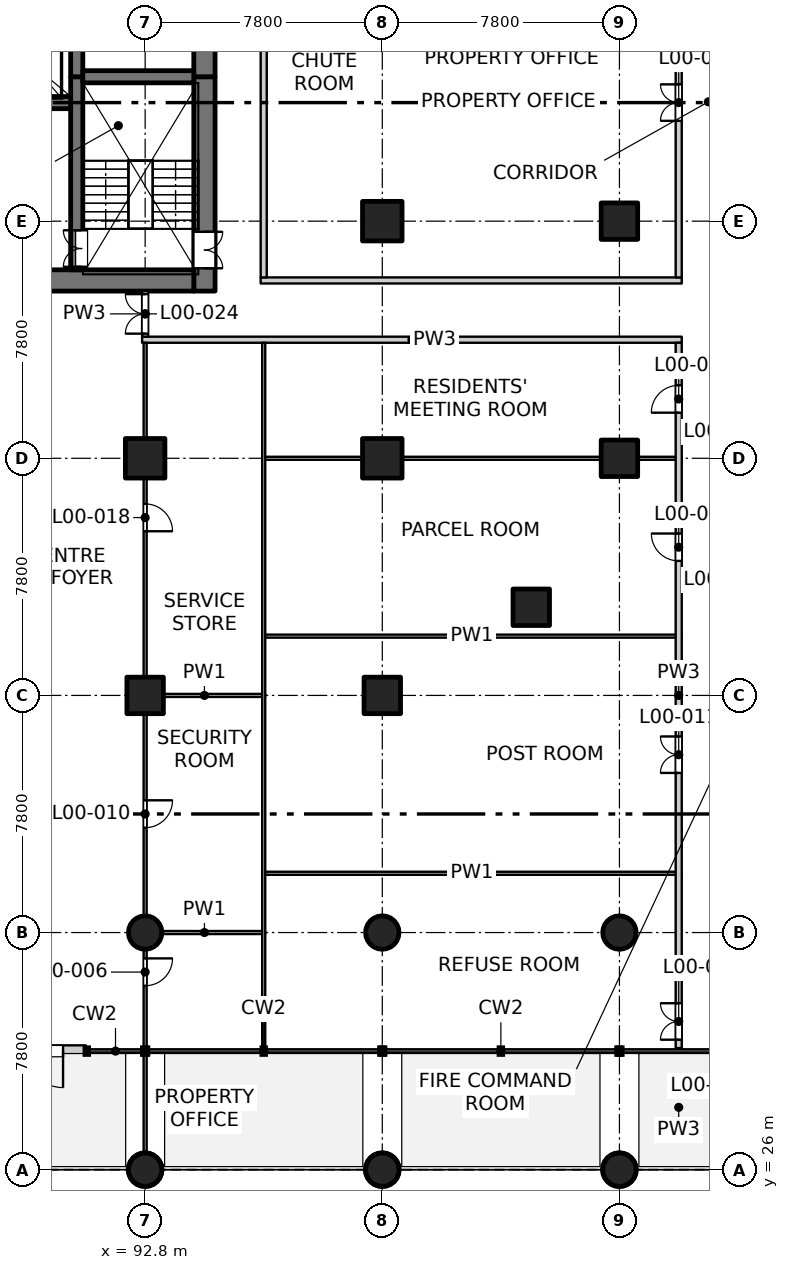
"""IFC4 building model, lengths in metres.
Left out: names, types, materials, properties, quantities, classifications, styles, units other than length and angle.
Written with IfcOpenShell. Run it as: python <this file> out.ifc"""

import sys

from ifc_helpers import new_model, si_unit, direction, frame, frame_2d, origin, origin_2d, place, context, subcontext, project, spatial, rectangle, circle, extrude, element, fill, save


model = new_model("IFC4")
c1 = context("Model", 3, precision=1e-05, world=origin(), true_north=direction((0.0, 1.0)))
c2 = subcontext(c1, "Body", "Model", "MODEL_VIEW")
j1 = project(units=[si_unit("LENGTHUNIT", "METRE"), si_unit("PLANEANGLEUNIT", "RADIAN")], contexts=[c1])
p1 = place(None, origin())
s1 = spatial("IfcSite", under=j1, at=p1, CompositionType="ELEMENT")
p2 = place(p1, origin())
s2 = spatial("IfcBuilding", under=s1, at=p2, CompositionType="ELEMENT")
p3 = place(p2, origin())
s3 = spatial("IfcBuildingStorey", under=s2, at=p3, CompositionType="ELEMENT", Elevation=0.0)
for number, where, z_axis, x_axis in (
    (1, (105.5, 44.5, -0.4), (0.0, 0.0, 1.0), (1.0, 0.0, 0.0)),
    (2, (108.4, 49.4, -0.4), (0.0, 0.0, 1.0), (1.0, 0.0, 0.0)),
    (3, (108.4, 57.2, -0.4), (0.0, 0.0, 1.0), (1.0, 0.0, 0.0)),
    (4, (92.8, 41.6, -0.4), (0.0, 0.0, 1.0), (1.0, 0.0, 0.0)),
    (5, (100.6, 41.6, -0.4), (0.0, 0.0, 1.0), (1.0, 0.0, 0.0)),
):
    element("IfcColumn", number, at=place(p3, frame(where, z_axis=z_axis, x_axis=x_axis)), inside=s3, PredefinedType="COLUMN", context=c2, shape_type="SweptSolid", body=[
        extrude(rectangle(XDim=1.2, YDim=1.2, at=origin_2d()), origin(), (0.0, 0.0, 1.0), 6.1),
    ])
for number, where, z_axis, x_axis in (
    (6, (92.8, 49.4, -0.4), (0.0, 0.0, 1.0), (1.0, 0.0, 0.0)),
    (7, (100.6, 49.4, -0.4), (0.0, 0.0, 1.0), (1.0, 0.0, 0.0)),
    (8, (100.6, 57.2, -0.4), (0.0, 0.0, 1.0), (1.0, 0.0, 0.0)),
):
    element("IfcColumn", number, at=place(p3, frame(where, z_axis=z_axis, x_axis=x_axis)), inside=s3, PredefinedType="COLUMN", context=c2, shape_type="SweptSolid", body=[
        extrude(rectangle(XDim=1.3, YDim=1.3, at=origin_2d()), origin(), (0.0, 0.0, 1.0), 6.1),
    ])
for number, where, z_axis, x_axis in (
    (9, (92.8, 26.0, -0.4), (0.0, 0.0, 1.0), (1.0, 0.0, 0.0)),
    (10, (92.8, 33.8, -0.4), (0.0, 0.0, 1.0), (1.0, 0.0, 0.0)),
    (11, (100.6, 26.0, -0.4), (0.0, 0.0, 1.0), (1.0, 0.0, 0.0)),
    (12, (100.6, 33.8, -0.4), (0.0, 0.0, 1.0), (1.0, 0.0, 0.0)),
    (13, (108.4, 26.0, -0.4), (0.0, 0.0, 1.0), (1.0, 0.0, 0.0)),
    (14, (108.4, 33.8, -0.4), (0.0, 0.0, 1.0), (1.0, 0.0, 0.0)),
):
    element("IfcColumn", number, at=place(p3, frame(where, z_axis=z_axis, x_axis=x_axis)), inside=s3, PredefinedType="COLUMN", context=c2, shape_type="SweptSolid", body=[
        extrude(circle(Radius=0.55, at=origin_2d()), origin(), (0.0, 0.0, 1.0), 6.1),
    ])
p4 = place(p3, frame((94.75, 54.9, -0.4), z_axis=(0.0, 0.0, 1.0), x_axis=(0.0, 1.0, 0.0)))
e15 = element("IfcWall", 15, at=p4, inside=s3, PredefinedType="SOLIDWALL", context=c2, shape_type="SweptSolid", body=[
    extrude(rectangle(XDim=7.05, YDim=0.7, at=frame_2d((3.525, 0.0))), origin(), (0.0, 0.0, 1.0), 6.1),
])
p5 = place(p4, frame((0.75, 0.0, 0.4)))
e16 = element("IfcOpeningElement", 16, at=p5, cuts=e15, PredefinedType="OPENING", context=c2, shape_type="SweptSolid", body=[
    extrude(rectangle(XDim=1.2, YDim=2.1, at=frame_2d((0.6, 1.05))), frame((0.0, 0.36, 0.0), z_axis=(0.0, -1.0, 0.0), x_axis=(1.0, 0.0, 0.0)), (0.0, 0.0, 1.0), 0.72),
])
p6 = place(p3, frame((94.75, 61.95, -0.4), z_axis=(0.0, 0.0, 1.0), x_axis=(0.0, 1.0, 0.0)))
e17 = element("IfcWall", 17, at=p6, inside=s3, PredefinedType="SOLIDWALL", context=c2, shape_type="SweptSolid", body=[
    extrude(rectangle(XDim=15.35, YDim=0.7, at=frame_2d((7.675, 0.0))), origin(), (0.0, 0.0, 1.0), 6.1),
])
p7 = place(p6, frame((0.925, 0.0, 0.4)))
e18 = element("IfcOpeningElement", 18, at=p7, cuts=e17, PredefinedType="OPENING", context=c2, shape_type="SweptSolid", body=[
    extrude(rectangle(XDim=0.9, YDim=2.1, at=frame_2d((0.45, 1.05))), frame((0.0, 0.36, 0.0), z_axis=(0.0, -1.0, 0.0), x_axis=(1.0, 0.0, 0.0)), (0.0, 0.0, 1.0), 0.72),
])
p8 = place(p6, frame((6.8, 0.0, 0.4)))
e19 = element("IfcOpeningElement", 19, at=p8, cuts=e17, PredefinedType="OPENING", context=c2, shape_type="SweptSolid", body=[
    extrude(rectangle(XDim=0.9, YDim=2.1, at=frame_2d((0.45, 1.05))), frame((0.0, 0.36, 0.0), z_axis=(0.0, -1.0, 0.0), x_axis=(1.0, 0.0, 0.0)), (0.0, 0.0, 1.0), 0.72),
])
p9 = place(p6, frame((13.1, 0.0, 0.4)))
e20 = element("IfcOpeningElement", 20, at=p9, cuts=e17, PredefinedType="OPENING", context=c2, shape_type="SweptSolid", body=[
    extrude(rectangle(XDim=0.9, YDim=2.1, at=frame_2d((0.45, 1.05))), frame((0.0, 0.36, 0.0), z_axis=(0.0, -1.0, 0.0), x_axis=(1.0, 0.0, 0.0)), (0.0, 0.0, 1.0), 0.72),
])
p10 = place(p3, frame((75.6, 55.25, -0.4), z_axis=(0.0, 0.0, 1.0), x_axis=(1.0, 0.0, 0.0)))
e21 = element("IfcWall", 21, at=p10, inside=s3, PredefinedType="SOLIDWALL", context=c2, shape_type="SweptSolid", body=[
    extrude(rectangle(XDim=18.8, YDim=0.7, at=frame_2d((9.4, 0.0))), origin(), (0.0, 0.0, 1.0), 6.1),
])
p11 = place(p10, frame((8.65, 0.0, 0.4)))
e22 = element("IfcOpeningElement", 22, at=p11, cuts=e21, PredefinedType="OPENING", context=c2, shape_type="SweptSolid", body=[
    extrude(rectangle(XDim=1.5, YDim=2.1, at=frame_2d((0.75, 1.05))), frame((0.0, 0.36, 0.0), z_axis=(0.0, -1.0, 0.0), x_axis=(1.0, 0.0, 0.0)), (0.0, 0.0, 1.0), 0.72),
])
p12 = place(p3, frame((90.55, 55.6, -0.4), z_axis=(0.0, 0.0, 1.0), x_axis=(0.0, 1.0, 0.0)))
e23 = element("IfcWall", 23, at=p12, inside=s3, PredefinedType="SOLIDWALL", context=c2, shape_type="SweptSolid", body=[
    extrude(rectangle(XDim=6.35, YDim=0.4, at=frame_2d((3.175, 0.0))), origin(), (0.0, 0.0, 1.0), 6.1),
])
p13 = place(p12, frame((0.1, 0.0, 0.4)))
e24 = element("IfcOpeningElement", 24, at=p13, cuts=e23, PredefinedType="OPENING", context=c2, shape_type="SweptSolid", body=[
    extrude(rectangle(XDim=1.2, YDim=2.1, at=frame_2d((0.6, 1.05))), frame((0.0, 0.21, 0.0), z_axis=(0.0, -1.0, 0.0), x_axis=(1.0, 0.0, 0.0)), (0.0, 0.0, 1.0), 0.42),
])
p14 = place(p3, frame((90.55, 61.95, -0.4), z_axis=(0.0, 0.0, 1.0), x_axis=(0.0, 1.0, 0.0)))
e25 = element("IfcWall", 25, at=p14, inside=s3, PredefinedType="SOLIDWALL", context=c2, shape_type="SweptSolid", body=[
    extrude(rectangle(XDim=15.35, YDim=0.4, at=frame_2d((7.675, 0.0))), origin(), (0.0, 0.0, 1.0), 6.1),
])
p15 = place(p3, frame((87.35, 61.1, -0.4), z_axis=(0.0, 0.0, 1.0), x_axis=(1.0, 0.0, 0.0)))
e26 = element("IfcWall", 26, at=p15, inside=s3, PredefinedType="SOLIDWALL", context=c2, shape_type="SweptSolid", body=[
    extrude(rectangle(XDim=3.0, YDim=0.4, at=frame_2d((1.5, 0.0))), origin(), (0.0, 0.0, 1.0), 6.1),
])
p16 = place(p3, frame((90.75, 61.95, -0.4), z_axis=(0.0, 0.0, 1.0), x_axis=(1.0, 0.0, 0.0)))
e27 = element("IfcWall", 27, at=p16, inside=s3, PredefinedType="SOLIDWALL", context=c2, shape_type="SweptSolid", body=[
    extrude(rectangle(XDim=3.65, YDim=0.4, at=frame_2d((1.825, 0.0))), origin(), (0.0, 0.0, 1.0), 6.1),
])
p17 = place(p3, frame((86.95, 29.9, 0.0), z_axis=(0.0, 0.0, 1.0), x_axis=(1.0, 0.0, 0.0)))
e28 = element("IfcWall", 28, at=p17, inside=s3, PredefinedType="SOLIDWALL", context=c2, shape_type="SweptSolid", body=[
    extrude(rectangle(XDim=3.9, YDim=0.38, at=frame_2d((1.95, 0.0))), origin(), (0.0, 0.0, 1.0), 5.7),
])
p18 = place(p17, frame((0.75, 0.0, 0.0)))
e29 = element("IfcOpeningElement", 29, at=p18, cuts=e28, PredefinedType="OPENING", context=c2, shape_type="SweptSolid", body=[
    extrude(rectangle(XDim=2.4, YDim=2.4, at=frame_2d((1.2, 1.2))), frame((0.0, 0.2, 0.0), z_axis=(0.0, -1.0, 0.0), x_axis=(1.0, 0.0, 0.0)), (0.0, 0.0, 1.0), 0.4),
])
p19 = place(p3, frame((92.75, 33.8, 0.0), z_axis=(0.0, 0.0, 1.0), x_axis=(1.0, 0.0, 0.0)))
e30 = element("IfcWall", 30, at=p19, inside=s3, PredefinedType="PARTITIONING", context=c2, shape_type="SweptSolid", body=[
    extrude(rectangle(XDim=4.0, YDim=0.1, at=frame_2d((2.0, 0.0))), origin(), (0.0, 0.0, 1.0), 5.7),
])
p20 = place(p3, frame((96.65, 35.75, 0.0), z_axis=(0.0, 0.0, 1.0), x_axis=(1.0, 0.0, 0.0)))
e31 = element("IfcWall", 31, at=p20, inside=s3, PredefinedType="PARTITIONING", context=c2, shape_type="SweptSolid", body=[
    extrude(rectangle(XDim=13.8, YDim=0.1, at=frame_2d((6.9, 0.0))), origin(), (0.0, 0.0, 1.0), 5.7),
])
p21 = place(p3, frame((92.75, 41.6, 0.0), z_axis=(0.0, 0.0, 1.0), x_axis=(1.0, 0.0, 0.0)))
e32 = element("IfcWall", 32, at=p21, inside=s3, PredefinedType="PARTITIONING", context=c2, shape_type="SweptSolid", body=[
    extrude(rectangle(XDim=4.0, YDim=0.1, at=frame_2d((2.0, 0.0))), origin(), (0.0, 0.0, 1.0), 5.7),
])
for number, where, z_axis, x_axis in (
    (33, (96.65, 43.55, 0.0), (0.0, 0.0, 1.0), (1.0, 0.0, 0.0)),
    (34, (96.65, 49.4, 0.0), (0.0, 0.0, 1.0), (1.0, 0.0, 0.0)),
):
    element("IfcWall", number, at=place(p3, frame(where, z_axis=z_axis, x_axis=x_axis)), inside=s3, PredefinedType="PARTITIONING", context=c2, shape_type="SweptSolid", body=[
        extrude(rectangle(XDim=13.8, YDim=0.1, at=frame_2d((6.9, 0.0))), origin(), (0.0, 0.0, 1.0), 5.7),
    ])
p22 = place(p3, frame((92.7, 53.3, 0.0), z_axis=(0.0, 0.0, 1.0), x_axis=(1.0, 0.0, 0.0)))
e35 = element("IfcWall", 35, at=p22, inside=s3, PredefinedType="PARTITIONING", context=c2, shape_type="SweptSolid", body=[
    extrude(rectangle(XDim=17.75, YDim=0.2, at=frame_2d((8.875, 0.0))), origin(), (0.0, 0.0, 1.0), 5.7),
])
p23 = place(p3, frame((96.6, 55.25, 0.0), z_axis=(0.0, 0.0, 1.0), x_axis=(1.0, 0.0, 0.0)))
e36 = element("IfcWall", 36, at=p23, inside=s3, PredefinedType="PARTITIONING", context=c2, shape_type="SweptSolid", body=[
    extrude(rectangle(XDim=13.85, YDim=0.2, at=frame_2d((6.925, 0.0))), origin(), (0.0, 0.0, 1.0), 5.7),
])
p24 = place(p3, frame((92.8, 26.3, 0.0), z_axis=(0.0, 0.0, 1.0), x_axis=(0.0, 1.0, 0.0)))
e37 = element("IfcWall", 37, at=p24, inside=s3, PredefinedType="PARTITIONING", context=c2, shape_type="SweptSolid", body=[
    extrude(rectangle(XDim=3.5, YDim=0.1, at=frame_2d((1.75, 0.0))), origin(), (0.0, 0.0, 1.0), 5.7),
])
p25 = place(p3, frame((92.8, 30.0, 0.0), z_axis=(0.0, 0.0, 1.0), x_axis=(0.0, 1.0, 0.0)))
e38 = element("IfcWall", 38, at=p25, inside=s3, PredefinedType="PARTITIONING", context=c2, shape_type="SweptSolid", body=[
    extrude(rectangle(XDim=23.2, YDim=0.1, at=frame_2d((11.6, 0.0))), origin(), (0.0, 0.0, 1.0), 5.7),
])
p26 = place(p25, frame((2.05, 0.0, 0.0)))
e39 = element("IfcOpeningElement", 39, at=p26, cuts=e38, PredefinedType="OPENING", context=c2, shape_type="SweptSolid", body=[
    extrude(rectangle(XDim=0.9, YDim=2.1, at=frame_2d((0.45, 1.05))), frame((0.0, 0.06, 0.0), z_axis=(0.0, -1.0, 0.0), x_axis=(1.0, 0.0, 0.0)), (0.0, 0.0, 1.0), 0.12),
])
p27 = place(p25, frame((7.25, 0.0, 0.0)))
e40 = element("IfcOpeningElement", 40, at=p27, cuts=e38, PredefinedType="OPENING", context=c2, shape_type="SweptSolid", body=[
    extrude(rectangle(XDim=0.9, YDim=2.1, at=frame_2d((0.45, 1.05))), frame((0.0, 0.06, 0.0), z_axis=(0.0, -1.0, 0.0), x_axis=(1.0, 0.0, 0.0)), (0.0, 0.0, 1.0), 0.12),
])
p28 = place(p25, frame((17.0, 0.0, 0.0)))
e41 = element("IfcOpeningElement", 41, at=p28, cuts=e38, PredefinedType="OPENING", context=c2, shape_type="SweptSolid", body=[
    extrude(rectangle(XDim=0.9, YDim=2.1, at=frame_2d((0.45, 1.05))), frame((0.0, 0.06, 0.0), z_axis=(0.0, -1.0, 0.0), x_axis=(1.0, 0.0, 0.0)), (0.0, 0.0, 1.0), 0.12),
])
p29 = place(p3, frame((92.8, 53.4, 0.0), z_axis=(0.0, 0.0, 1.0), x_axis=(0.0, 1.0, 0.0)))
e42 = element("IfcWall", 42, at=p29, inside=s3, PredefinedType="PARTITIONING", context=c2, shape_type="SweptSolid", body=[
    extrude(rectangle(XDim=1.5, YDim=0.2, at=frame_2d((0.75, 0.0))), origin(), (0.0, 0.0, 1.0), 5.7),
])
p30 = place(p29, frame((0.1, 0.0, 0.0)))
e43 = element("IfcOpeningElement", 43, at=p30, cuts=e42, PredefinedType="OPENING", context=c2, shape_type="SweptSolid", body=[
    extrude(rectangle(XDim=1.3, YDim=2.1, at=frame_2d((0.65, 1.05))), frame((0.0, 0.11, 0.0), z_axis=(0.0, -1.0, 0.0), x_axis=(1.0, 0.0, 0.0)), (0.0, 0.0, 1.0), 0.22),
])
p31 = place(p3, frame((96.7, 26.3, 0.0), z_axis=(0.0, 0.0, 1.0), x_axis=(0.0, 1.0, 0.0)))
e44 = element("IfcWall", 44, at=p31, inside=s3, PredefinedType="PARTITIONING", context=c2, shape_type="SweptSolid", body=[
    extrude(rectangle(XDim=3.5, YDim=0.1, at=frame_2d((1.75, 0.0))), origin(), (0.0, 0.0, 1.0), 5.7),
])
p32 = place(p3, frame((96.7, 30.0, 0.0), z_axis=(0.0, 0.0, 1.0), x_axis=(0.0, 1.0, 0.0)))
e45 = element("IfcWall", 45, at=p32, inside=s3, PredefinedType="PARTITIONING", context=c2, shape_type="SweptSolid", body=[
    extrude(rectangle(XDim=23.2, YDim=0.1, at=frame_2d((11.6, 0.0))), origin(), (0.0, 0.0, 1.0), 5.7),
])
p33 = place(p3, frame((96.7, 55.35, 0.0), z_axis=(0.0, 0.0, 1.0), x_axis=(0.0, 1.0, 0.0)))
e46 = element("IfcWall", 46, at=p33, inside=s3, PredefinedType="PARTITIONING", context=c2, shape_type="SweptSolid", body=[
    extrude(rectangle(XDim=32.75, YDim=0.2, at=frame_2d((16.375, 0.0))), origin(), (0.0, 0.0, 1.0), 5.7),
])
p34 = place(p3, frame((110.35, 26.3, 0.0), z_axis=(0.0, 0.0, 1.0), x_axis=(0.0, 1.0, 0.0)))
e47 = element("IfcWall", 47, at=p34, inside=s3, PredefinedType="PARTITIONING", context=c2, shape_type="SweptSolid", body=[
    extrude(rectangle(XDim=3.5, YDim=0.2, at=frame_2d((1.75, 0.0))), origin(), (0.0, 0.0, 1.0), 5.7),
])
p35 = place(p3, frame((110.35, 30.0, 0.0), z_axis=(0.0, 0.0, 1.0), x_axis=(0.0, 1.0, 0.0)))
e48 = element("IfcWall", 48, at=p35, inside=s3, PredefinedType="PARTITIONING", context=c2, shape_type="SweptSolid", body=[
    extrude(rectangle(XDim=23.2, YDim=0.2, at=frame_2d((11.6, 0.0))), origin(), (0.0, 0.0, 1.0), 5.7),
])
p36 = place(p35, frame((0.275, 0.0, 0.0)))
e49 = element("IfcOpeningElement", 49, at=p36, cuts=e48, PredefinedType="OPENING", context=c2, shape_type="SweptSolid", body=[
    extrude(rectangle(XDim=1.2, YDim=2.1, at=frame_2d((0.6, 1.05))), frame((0.0, 0.11, 0.0), z_axis=(0.0, -1.0, 0.0), x_axis=(1.0, 0.0, 0.0)), (0.0, 0.0, 1.0), 0.22),
])
p37 = place(p35, frame((9.05, 0.0, 0.0)))
e50 = element("IfcOpeningElement", 50, at=p37, cuts=e48, PredefinedType="OPENING", context=c2, shape_type="SweptSolid", body=[
    extrude(rectangle(XDim=1.2, YDim=2.1, at=frame_2d((0.6, 1.05))), frame((0.0, 0.11, 0.0), z_axis=(0.0, -1.0, 0.0), x_axis=(1.0, 0.0, 0.0)), (0.0, 0.0, 1.0), 0.22),
])
p38 = place(p35, frame((16.025, 0.0, 0.0)))
e51 = element("IfcOpeningElement", 51, at=p38, cuts=e48, PredefinedType="OPENING", context=c2, shape_type="SweptSolid", body=[
    extrude(rectangle(XDim=0.9, YDim=2.1, at=frame_2d((0.45, 1.05))), frame((0.0, 0.11, 0.0), z_axis=(0.0, -1.0, 0.0), x_axis=(1.0, 0.0, 0.0)), (0.0, 0.0, 1.0), 0.22),
])
p39 = place(p35, frame((20.9, 0.0, 0.0)))
e52 = element("IfcOpeningElement", 52, at=p39, cuts=e48, PredefinedType="OPENING", context=c2, shape_type="SweptSolid", body=[
    extrude(rectangle(XDim=0.9, YDim=2.1, at=frame_2d((0.45, 1.05))), frame((0.0, 0.11, 0.0), z_axis=(0.0, -1.0, 0.0), x_axis=(1.0, 0.0, 0.0)), (0.0, 0.0, 1.0), 0.22),
])
p40 = place(p3, frame((110.35, 55.35, 0.0), z_axis=(0.0, 0.0, 1.0), x_axis=(0.0, 1.0, 0.0)))
e53 = element("IfcWall", 53, at=p40, inside=s3, PredefinedType="PARTITIONING", context=c2, shape_type="SweptSolid", body=[
    extrude(rectangle(XDim=32.75, YDim=0.2, at=frame_2d((16.375, 0.0))), origin(), (0.0, 0.0, 1.0), 5.7),
])
p41 = place(p40, frame((5.15, 0.0, 0.0)))
e54 = element("IfcOpeningElement", 54, at=p41, cuts=e53, PredefinedType="OPENING", context=c2, shape_type="SweptSolid", body=[
    extrude(rectangle(XDim=1.2, YDim=2.1, at=frame_2d((0.6, 1.05))), frame((0.0, 0.11, 0.0), z_axis=(0.0, -1.0, 0.0), x_axis=(1.0, 0.0, 0.0)), (0.0, 0.0, 1.0), 0.22),
])
p42 = place(p40, frame((14.9, 0.0, 0.0)))
e55 = element("IfcOpeningElement", 55, at=p42, cuts=e53, PredefinedType="OPENING", context=c2, shape_type="SweptSolid", body=[
    extrude(rectangle(XDim=1.2, YDim=2.1, at=frame_2d((0.6, 1.05))), frame((0.0, 0.11, 0.0), z_axis=(0.0, -1.0, 0.0), x_axis=(1.0, 0.0, 0.0)), (0.0, 0.0, 1.0), 0.22),
])
p43 = place(p40, frame((22.7, 0.0, 0.0)))
e56 = element("IfcOpeningElement", 56, at=p43, cuts=e53, PredefinedType="OPENING", context=c2, shape_type="SweptSolid", body=[
    extrude(rectangle(XDim=1.2, YDim=2.1, at=frame_2d((0.6, 1.05))), frame((0.0, 0.11, 0.0), z_axis=(0.0, -1.0, 0.0), x_axis=(1.0, 0.0, 0.0)), (0.0, 0.0, 1.0), 0.22),
])
p44 = place(p40, frame((29.675, 0.0, 0.0)))
e57 = element("IfcOpeningElement", 57, at=p44, cuts=e53, PredefinedType="OPENING", context=c2, shape_type="SweptSolid", body=[
    extrude(rectangle(XDim=0.9, YDim=2.1, at=frame_2d((0.45, 1.05))), frame((0.0, 0.11, 0.0), z_axis=(0.0, -1.0, 0.0), x_axis=(1.0, 0.0, 0.0)), (0.0, 0.0, 1.0), 0.22),
])
p45 = place(p18, frame((2.4, 0.0, 0.0), z_axis=(0.0, 0.0, 1.0), x_axis=(-1.0, 0.0, 0.0)))
e58 = element("IfcDoor", 58, at=p45, inside=s3, OperationType="DOUBLE_DOOR_SINGLE_SWING", PredefinedType="DOOR", context=c2, shape_type="SweptSolid", body=[
    extrude(rectangle(XDim=2.4, YDim=2.4, at=frame_2d((1.2, 1.2))), frame((0.0, 0.025, 0.0), z_axis=(0.0, -1.0, 0.0), x_axis=(1.0, 0.0, 0.0)), (0.0, 0.0, 1.0), 0.05),
])
fill(e29, e58)
p46 = place(p36, origin())
e59 = element("IfcDoor", 59, at=p46, inside=s3, OperationType="DOUBLE_DOOR_SINGLE_SWING", PredefinedType="DOOR", context=c2, shape_type="SweptSolid", body=[
    extrude(rectangle(XDim=1.2, YDim=2.1, at=frame_2d((0.6, 1.05))), frame((0.0, 0.025, 0.0), z_axis=(0.0, -1.0, 0.0), x_axis=(1.0, 0.0, 0.0)), (0.0, 0.0, 1.0), 0.05),
])
fill(e49, e59)
p47 = place(p26, origin())
e60 = element("IfcDoor", 60, at=p47, inside=s3, OperationType="SINGLE_SWING_LEFT", PredefinedType="DOOR", context=c2, shape_type="SweptSolid", body=[
    extrude(rectangle(XDim=0.9, YDim=2.1, at=frame_2d((0.45, 1.05))), frame((0.0, 0.025, 0.0), z_axis=(0.0, -1.0, 0.0), x_axis=(1.0, 0.0, 0.0)), (0.0, 0.0, 1.0), 0.05),
])
fill(e39, e60)
p48 = place(p27, origin())
e61 = element("IfcDoor", 61, at=p48, inside=s3, OperationType="SINGLE_SWING_LEFT", PredefinedType="DOOR", context=c2, shape_type="SweptSolid", body=[
    extrude(rectangle(XDim=0.9, YDim=2.1, at=frame_2d((0.45, 1.05))), frame((0.0, 0.025, 0.0), z_axis=(0.0, -1.0, 0.0), x_axis=(1.0, 0.0, 0.0)), (0.0, 0.0, 1.0), 0.05),
])
fill(e40, e61)
p49 = place(p37, origin())
e62 = element("IfcDoor", 62, at=p49, inside=s3, OperationType="DOUBLE_DOOR_SINGLE_SWING", PredefinedType="DOOR", context=c2, shape_type="SweptSolid", body=[
    extrude(rectangle(XDim=1.2, YDim=2.1, at=frame_2d((0.6, 1.05))), frame((0.0, 0.025, 0.0), z_axis=(0.0, -1.0, 0.0), x_axis=(1.0, 0.0, 0.0)), (0.0, 0.0, 1.0), 0.05),
])
fill(e50, e62)
p50 = place(p38, origin())
e63 = element("IfcDoor", 63, at=p50, inside=s3, OperationType="SINGLE_SWING_RIGHT", PredefinedType="DOOR", context=c2, shape_type="SweptSolid", body=[
    extrude(rectangle(XDim=0.9, YDim=2.1, at=frame_2d((0.45, 1.05))), frame((0.0, 0.025, 0.0), z_axis=(0.0, -1.0, 0.0), x_axis=(1.0, 0.0, 0.0)), (0.0, 0.0, 1.0), 0.05),
])
fill(e51, e63)
p51 = place(p28, origin())
e64 = element("IfcDoor", 64, at=p51, inside=s3, OperationType="SINGLE_SWING_RIGHT", PredefinedType="DOOR", context=c2, shape_type="SweptSolid", body=[
    extrude(rectangle(XDim=0.9, YDim=2.1, at=frame_2d((0.45, 1.05))), frame((0.0, 0.025, 0.0), z_axis=(0.0, -1.0, 0.0), x_axis=(1.0, 0.0, 0.0)), (0.0, 0.0, 1.0), 0.05),
])
fill(e41, e64)
p52 = place(p39, origin())
e65 = element("IfcDoor", 65, at=p52, inside=s3, OperationType="SINGLE_SWING_LEFT", PredefinedType="DOOR", context=c2, shape_type="SweptSolid", body=[
    extrude(rectangle(XDim=0.9, YDim=2.1, at=frame_2d((0.45, 1.05))), frame((0.0, 0.025, 0.0), z_axis=(0.0, -1.0, 0.0), x_axis=(1.0, 0.0, 0.0)), (0.0, 0.0, 1.0), 0.05),
])
fill(e52, e65)
p53 = place(p30, origin())
e66 = element("IfcDoor", 66, at=p53, inside=s3, OperationType="DOUBLE_DOOR_SINGLE_SWING", PredefinedType="DOOR", context=c2, shape_type="SweptSolid", body=[
    extrude(rectangle(XDim=1.3, YDim=2.1, at=frame_2d((0.65, 1.05))), frame((0.0, 0.025, 0.0), z_axis=(0.0, -1.0, 0.0), x_axis=(1.0, 0.0, 0.0)), (0.0, 0.0, 1.0), 0.05),
])
fill(e43, e66)
p54 = place(p13, origin())
e67 = element("IfcDoor", 67, at=p54, inside=s3, OperationType="DOUBLE_DOOR_SINGLE_SWING", PredefinedType="DOOR", context=c2, shape_type="SweptSolid", body=[
    extrude(rectangle(XDim=1.2, YDim=2.1, at=frame_2d((0.6, 1.05))), frame((0.0, -0.135, 0.0), z_axis=(0.0, -1.0, 0.0), x_axis=(1.0, 0.0, 0.0)), (0.0, 0.0, 1.0), 0.05),
])
fill(e24, e67)
p55 = place(p5, frame((1.2, 0.0, 0.0), z_axis=(0.0, 0.0, 1.0), x_axis=(-1.0, 0.0, 0.0)))
e68 = element("IfcDoor", 68, at=p55, inside=s3, OperationType="DOUBLE_DOOR_SINGLE_SWING", PredefinedType="DOOR", context=c2, shape_type="SweptSolid", body=[
    extrude(rectangle(XDim=1.2, YDim=2.1, at=frame_2d((0.6, 1.05))), frame((0.0, 0.025, 0.0), z_axis=(0.0, -1.0, 0.0), x_axis=(1.0, 0.0, 0.0)), (0.0, 0.0, 1.0), 0.05),
])
fill(e16, e68)
p56 = place(p41, origin())
e69 = element("IfcDoor", 69, at=p56, inside=s3, OperationType="DOUBLE_DOOR_SINGLE_SWING", PredefinedType="DOOR", context=c2, shape_type="SweptSolid", body=[
    extrude(rectangle(XDim=1.2, YDim=2.1, at=frame_2d((0.6, 1.05))), frame((0.0, 0.025, 0.0), z_axis=(0.0, -1.0, 0.0), x_axis=(1.0, 0.0, 0.0)), (0.0, 0.0, 1.0), 0.05),
])
fill(e54, e69)
save(model, sys.argv[1])
